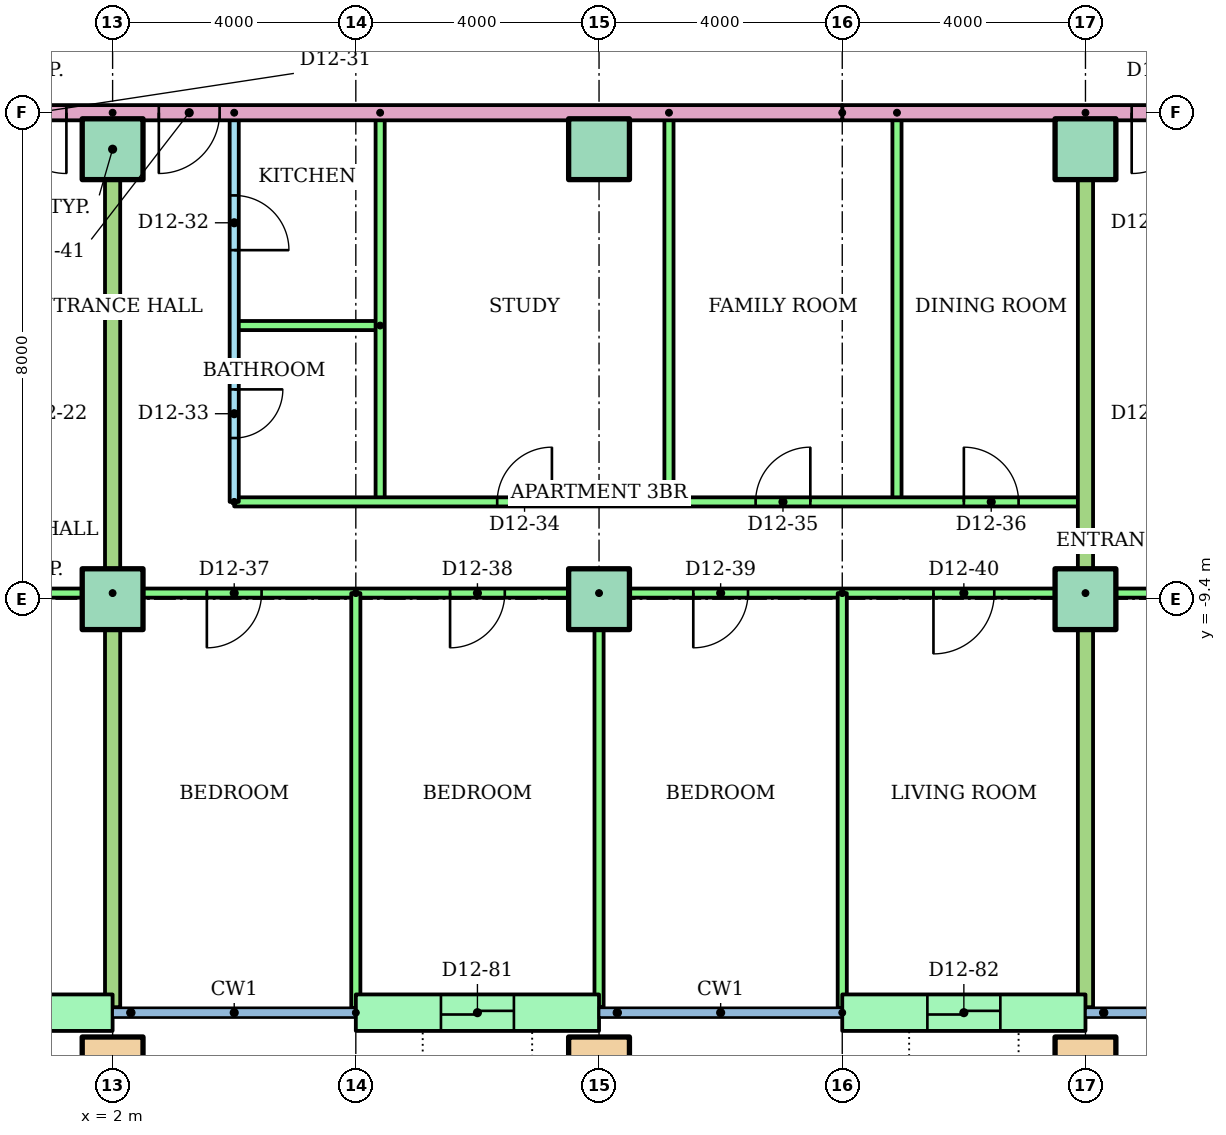
"""IFC4 building model, lengths in metres.
Left out: names, types, materials, properties, quantities, classifications, styles, units other than length and angle.
Written with IfcOpenShell. Run it as: python <this file> out.ifc"""

import sys

from ifc_helpers import new_model, si_unit, direction, frame, frame_2d, origin, origin_2d, place, context, subcontext, project, spatial, rectangle, hollow_rectangle, extrude, element, fill, save


model = new_model("IFC4")
c1 = context("Model", 3, precision=1e-05, world=origin(), true_north=direction((0.0, 1.0)))
c2 = subcontext(c1, "Body", "Model", "MODEL_VIEW")
j1 = project(units=[si_unit("LENGTHUNIT", "METRE"), si_unit("PLANEANGLEUNIT", "RADIAN")], contexts=[c1])
p1 = place(None, origin())
s1 = spatial("IfcSite", under=j1, at=p1, CompositionType="ELEMENT")
p2 = place(p1, origin())
s2 = spatial("IfcBuilding", under=s1, at=p2, CompositionType="ELEMENT")
p3 = place(p2, frame((0.0, 0.0, 48.0)))
s3 = spatial("IfcBuildingStorey", under=s2, at=p3, CompositionType="ELEMENT", Elevation=48.0)
for number, where in (
    (1, (2.0, -17.1, 0.0)),
    (2, (10.0, -17.1, 0.0)),
    (3, (18.0, -17.1, 0.0)),
):
    element("IfcColumn", number, at=place(p3, frame(where)), inside=s3, PredefinedType="COLUMN", context=c2, shape_type="SweptSolid", body=[
        extrude(hollow_rectangle(XDim=1.0, YDim=1.0, WallThickness=0.05, at=origin_2d()), origin(), (0.0, 0.0, 1.0), 3.2),
    ])
for number, where in (
    (4, (2.0, -9.4, 0.0)),
    (5, (10.0, -9.4, 0.0)),
    (6, (18.0, -9.4, 0.0)),
    (7, (2.0, -2.0, 0.0)),
    (8, (10.0, -2.0, 0.0)),
    (9, (18.0, -2.0, 0.0)),
):
    element("IfcColumn", number, at=place(p3, frame(where)), inside=s3, PredefinedType="COLUMN", context=c2, shape_type="SweptSolid", body=[
        extrude(rectangle(XDim=1.0, YDim=1.0, at=origin_2d()), origin(), (0.0, 0.0, 1.0), 3.2),
    ])
p4 = place(p3, frame((-2.0, -16.2, 0.0)))
e10 = element("IfcWall", 10, at=p4, inside=s3, PredefinedType="STANDARD", context=c2, shape_type="SweptSolid", body=[
    extrude(rectangle(XDim=4.0, YDim=0.6, at=frame_2d((2.0, 0.0))), origin(), (0.0, 0.0, 1.0), 2.92),
])
p5 = place(p4, frame((1.4, 0.0, 0.0)))
e11 = element("IfcOpeningElement", 11, at=p5, cuts=e10, PredefinedType="OPENING", context=c2, shape_type="SweptSolid", body=[
    extrude(rectangle(XDim=1.2, YDim=2.1, at=frame_2d((0.6, 1.05))), frame((0.0, 0.31, 0.0), z_axis=(0.0, -1.0, 0.0), x_axis=(1.0, 0.0, 0.0)), (0.0, 0.0, 1.0), 0.62),
])
p6 = place(p3, frame((6.0, -16.2, 0.0)))
e12 = element("IfcWall", 12, at=p6, inside=s3, PredefinedType="STANDARD", context=c2, shape_type="SweptSolid", body=[
    extrude(rectangle(XDim=4.0, YDim=0.6, at=frame_2d((2.0, 0.0))), origin(), (0.0, 0.0, 1.0), 2.92),
])
p7 = place(p6, frame((1.4, 0.0, 0.0)))
e13 = element("IfcOpeningElement", 13, at=p7, cuts=e12, PredefinedType="OPENING", context=c2, shape_type="SweptSolid", body=[
    extrude(rectangle(XDim=1.2, YDim=2.1, at=frame_2d((0.6, 1.05))), frame((0.0, 0.31, 0.0), z_axis=(0.0, -1.0, 0.0), x_axis=(1.0, 0.0, 0.0)), (0.0, 0.0, 1.0), 0.62),
])
p8 = place(p3, frame((14.0, -16.2, 0.0)))
e14 = element("IfcWall", 14, at=p8, inside=s3, PredefinedType="STANDARD", context=c2, shape_type="SweptSolid", body=[
    extrude(rectangle(XDim=4.0, YDim=0.6, at=frame_2d((2.0, 0.0))), origin(), (0.0, 0.0, 1.0), 2.92),
])
p9 = place(p8, frame((1.4, 0.0, 0.0)))
e15 = element("IfcOpeningElement", 15, at=p9, cuts=e14, PredefinedType="OPENING", context=c2, shape_type="SweptSolid", body=[
    extrude(rectangle(XDim=1.2, YDim=2.1, at=frame_2d((0.6, 1.05))), frame((0.0, 0.31, 0.0), z_axis=(0.0, -1.0, 0.0), x_axis=(1.0, 0.0, 0.0)), (0.0, 0.0, 1.0), 0.62),
])
p10 = place(p3, frame((2.0, -9.3, 0.0), z_axis=(0.0, 0.0, 1.0), x_axis=(-1.0, 0.0, 0.0)))
e16 = element("IfcWall", 16, at=p10, inside=s3, PredefinedType="PARTITIONING", context=c2, shape_type="SweptSolid", body=[
    extrude(rectangle(XDim=24.0, YDim=0.15, at=frame_2d((12.0, 0.0))), origin(), (0.0, 0.0, 1.0), 2.4),
])
p11 = place(p10, frame((19.5, 0.0, 0.0)))
e17 = element("IfcOpeningElement", 17, at=p11, cuts=e16, PredefinedType="OPENING", context=c2, shape_type="SweptSolid", body=[
    extrude(rectangle(XDim=1.0, YDim=2.1, at=frame_2d((0.5, 1.05))), frame((0.0, 0.085, 0.0), z_axis=(0.0, -1.0, 0.0), x_axis=(1.0, 0.0, 0.0)), (0.0, 0.0, 1.0), 0.17),
])
p12 = place(p10, frame((13.55, 0.0, 0.0)))
e18 = element("IfcOpeningElement", 18, at=p12, cuts=e16, PredefinedType="OPENING", context=c2, shape_type="SweptSolid", body=[
    extrude(rectangle(XDim=0.9, YDim=2.1, at=frame_2d((0.45, 1.05))), frame((0.0, 0.085, 0.0), z_axis=(0.0, -1.0, 0.0), x_axis=(1.0, 0.0, 0.0)), (0.0, 0.0, 1.0), 0.17),
])
p13 = place(p10, frame((9.55, 0.0, 0.0)))
e19 = element("IfcOpeningElement", 19, at=p13, cuts=e16, PredefinedType="OPENING", context=c2, shape_type="SweptSolid", body=[
    extrude(rectangle(XDim=0.9, YDim=2.1, at=frame_2d((0.45, 1.05))), frame((0.0, 0.085, 0.0), z_axis=(0.0, -1.0, 0.0), x_axis=(1.0, 0.0, 0.0)), (0.0, 0.0, 1.0), 0.17),
])
p14 = place(p10, frame((5.55, 0.0, 0.0)))
e20 = element("IfcOpeningElement", 20, at=p14, cuts=e16, PredefinedType="OPENING", context=c2, shape_type="SweptSolid", body=[
    extrude(rectangle(XDim=0.9, YDim=2.1, at=frame_2d((0.45, 1.05))), frame((0.0, 0.085, 0.0), z_axis=(0.0, -1.0, 0.0), x_axis=(1.0, 0.0, 0.0)), (0.0, 0.0, 1.0), 0.17),
])
p15 = place(p10, frame((1.55, 0.0, 0.0)))
e21 = element("IfcOpeningElement", 21, at=p15, cuts=e16, PredefinedType="OPENING", context=c2, shape_type="SweptSolid", body=[
    extrude(rectangle(XDim=0.9, YDim=2.1, at=frame_2d((0.45, 1.05))), frame((0.0, 0.085, 0.0), z_axis=(0.0, -1.0, 0.0), x_axis=(1.0, 0.0, 0.0)), (0.0, 0.0, 1.0), 0.17),
])
p16 = place(p3, frame((4.0, -1.4, 0.0), z_axis=(0.0, 0.0, 1.0), x_axis=(0.0, -1.0, 0.0)))
e22 = element("IfcWall", 22, at=p16, inside=s3, PredefinedType="PARTITIONING", context=c2, shape_type="SweptSolid", body=[
    extrude(rectangle(XDim=6.4, YDim=0.15, at=frame_2d((3.2, 0.0))), origin(), (0.0, 0.0, 1.0), 2.4),
])
p17 = place(p16, frame((1.36, 0.0, 0.0)))
e23 = element("IfcOpeningElement", 23, at=p17, cuts=e22, PredefinedType="OPENING", context=c2, shape_type="SweptSolid", body=[
    extrude(rectangle(XDim=0.9, YDim=2.1, at=frame_2d((0.45, 1.05))), frame((0.0, 0.085, 0.0), z_axis=(0.0, -1.0, 0.0), x_axis=(1.0, 0.0, 0.0)), (0.0, 0.0, 1.0), 0.17),
])
p18 = place(p16, frame((4.55, 0.0, 0.0)))
e24 = element("IfcOpeningElement", 24, at=p18, cuts=e22, PredefinedType="OPENING", context=c2, shape_type="SweptSolid", body=[
    extrude(rectangle(XDim=0.8, YDim=2.1, at=frame_2d((0.4, 1.05))), frame((0.0, 0.085, 0.0), z_axis=(0.0, -1.0, 0.0), x_axis=(1.0, 0.0, 0.0)), (0.0, 0.0, 1.0), 0.17),
])
p19 = place(p3, frame((6.4, -4.9, 0.0), z_axis=(0.0, 0.0, 1.0), x_axis=(-1.0, 0.0, 0.0)))
e25 = element("IfcWall", 25, at=p19, inside=s3, PredefinedType="PARTITIONING", context=c2, shape_type="SweptSolid", body=[
    extrude(rectangle(XDim=2.4, YDim=0.15, at=frame_2d((1.2, 0.0))), origin(), (0.0, 0.0, 1.0), 2.4),
])
for number, where, z_axis, x_axis in (
    (26, (6.4, -1.4, 0.0), (0.0, 0.0, 1.0), (0.0, -1.0, 0.0)),
    (27, (11.15, -1.4, 0.0), (0.0, 0.0, 1.0), (0.0, -1.0, 0.0)),
    (28, (14.9, -1.4, 0.0), (0.0, 0.0, 1.0), (0.0, -1.0, 0.0)),
):
    element("IfcWall", number, at=place(p3, frame(where, z_axis=z_axis, x_axis=x_axis)), inside=s3, PredefinedType="PARTITIONING", context=c2, shape_type="SweptSolid", body=[
        extrude(rectangle(XDim=6.4, YDim=0.15, at=frame_2d((3.2, 0.0))), origin(), (0.0, 0.0, 1.0), 2.4),
    ])
p20 = place(p3, frame((4.0, -7.8, 0.0)))
e29 = element("IfcWall", 29, at=p20, inside=s3, PredefinedType="PARTITIONING", context=c2, shape_type="SweptSolid", body=[
    extrude(rectangle(XDim=14.0, YDim=0.15, at=frame_2d((7.0, 0.0))), origin(), (0.0, 0.0, 1.0), 2.4),
])
p21 = place(p20, frame((4.325, 0.0, 0.0)))
e30 = element("IfcOpeningElement", 30, at=p21, cuts=e29, PredefinedType="OPENING", context=c2, shape_type="SweptSolid", body=[
    extrude(rectangle(XDim=0.9, YDim=2.1, at=frame_2d((0.45, 1.05))), frame((0.0, 0.085, 0.0), z_axis=(0.0, -1.0, 0.0), x_axis=(1.0, 0.0, 0.0)), (0.0, 0.0, 1.0), 0.17),
])
p22 = place(p20, frame((8.575, 0.0, 0.0)))
e31 = element("IfcOpeningElement", 31, at=p22, cuts=e29, PredefinedType="OPENING", context=c2, shape_type="SweptSolid", body=[
    extrude(rectangle(XDim=0.9, YDim=2.1, at=frame_2d((0.45, 1.05))), frame((0.0, 0.085, 0.0), z_axis=(0.0, -1.0, 0.0), x_axis=(1.0, 0.0, 0.0)), (0.0, 0.0, 1.0), 0.17),
])
p23 = place(p20, frame((12.0, 0.0, 0.0)))
e32 = element("IfcOpeningElement", 32, at=p23, cuts=e29, PredefinedType="OPENING", context=c2, shape_type="SweptSolid", body=[
    extrude(rectangle(XDim=0.9, YDim=2.1, at=frame_2d((0.45, 1.05))), frame((0.0, 0.085, 0.0), z_axis=(0.0, -1.0, 0.0), x_axis=(1.0, 0.0, 0.0)), (0.0, 0.0, 1.0), 0.17),
])
p24 = place(p3, frame((18.0, -9.3, 0.0), z_axis=(0.0, 0.0, 1.0), x_axis=(-1.0, 0.0, 0.0)))
e33 = element("IfcWall", 33, at=p24, inside=s3, PredefinedType="PARTITIONING", context=c2, shape_type="SweptSolid", body=[
    extrude(rectangle(XDim=16.0, YDim=0.15, at=frame_2d((8.0, 0.0))), origin(), (0.0, 0.0, 1.0), 2.4),
])
p25 = place(p24, frame((13.55, 0.0, 0.0)))
e34 = element("IfcOpeningElement", 34, at=p25, cuts=e33, PredefinedType="OPENING", context=c2, shape_type="SweptSolid", body=[
    extrude(rectangle(XDim=0.9, YDim=2.1, at=frame_2d((0.45, 1.05))), frame((0.0, 0.085, 0.0), z_axis=(0.0, -1.0, 0.0), x_axis=(1.0, 0.0, 0.0)), (0.0, 0.0, 1.0), 0.17),
])
p26 = place(p24, frame((9.55, 0.0, 0.0)))
e35 = element("IfcOpeningElement", 35, at=p26, cuts=e33, PredefinedType="OPENING", context=c2, shape_type="SweptSolid", body=[
    extrude(rectangle(XDim=0.9, YDim=2.1, at=frame_2d((0.45, 1.05))), frame((0.0, 0.085, 0.0), z_axis=(0.0, -1.0, 0.0), x_axis=(1.0, 0.0, 0.0)), (0.0, 0.0, 1.0), 0.17),
])
p27 = place(p24, frame((5.55, 0.0, 0.0)))
e36 = element("IfcOpeningElement", 36, at=p27, cuts=e33, PredefinedType="OPENING", context=c2, shape_type="SweptSolid", body=[
    extrude(rectangle(XDim=0.9, YDim=2.1, at=frame_2d((0.45, 1.05))), frame((0.0, 0.085, 0.0), z_axis=(0.0, -1.0, 0.0), x_axis=(1.0, 0.0, 0.0)), (0.0, 0.0, 1.0), 0.17),
])
p28 = place(p24, frame((1.5, 0.0, 0.0)))
e37 = element("IfcOpeningElement", 37, at=p28, cuts=e33, PredefinedType="OPENING", context=c2, shape_type="SweptSolid", body=[
    extrude(rectangle(XDim=1.0, YDim=2.1, at=frame_2d((0.5, 1.05))), frame((0.0, 0.085, 0.0), z_axis=(0.0, -1.0, 0.0), x_axis=(1.0, 0.0, 0.0)), (0.0, 0.0, 1.0), 0.17),
])
p29 = place(p3, frame((6.0, -9.3, 0.0), z_axis=(0.0, 0.0, 1.0), x_axis=(0.0, -1.0, 0.0)))
e38 = element("IfcWall", 38, at=p29, inside=s3, PredefinedType="PARTITIONING", context=c2, shape_type="SweptSolid", body=[
    extrude(rectangle(XDim=6.821, YDim=0.15, at=frame_2d((3.411, 0.0))), origin(), (0.0, 0.0, 1.0), 2.4),
])
p30 = place(p3, frame((10.0, -9.3, 0.0), z_axis=(0.0, 0.0, 1.0), x_axis=(0.0, -1.0, 0.0)))
e39 = element("IfcWall", 39, at=p30, inside=s3, PredefinedType="PARTITIONING", context=c2, shape_type="SweptSolid", body=[
    extrude(rectangle(XDim=6.81, YDim=0.15, at=frame_2d((3.405, 0.0))), origin(), (0.0, 0.0, 1.0), 2.4),
])
p31 = place(p3, frame((14.0, -9.3, 0.0), z_axis=(0.0, 0.0, 1.0), x_axis=(0.0, -1.0, 0.0)))
e40 = element("IfcWall", 40, at=p31, inside=s3, PredefinedType="PARTITIONING", context=c2, shape_type="SweptSolid", body=[
    extrude(rectangle(XDim=6.821, YDim=0.15, at=frame_2d((3.411, 0.0))), origin(), (0.0, 0.0, 1.0), 2.4),
])
p32 = place(p3, frame((2.0, -1.4, 0.0), z_axis=(0.0, 0.0, 1.0), x_axis=(0.0, -1.0, 0.0)))
e41 = element("IfcWall", 41, at=p32, inside=s3, PredefinedType="PARTITIONING", context=c2, shape_type="SweptSolid", body=[
    extrude(rectangle(XDim=14.71, YDim=0.25, at=frame_2d((7.355, 0.0))), origin(), (0.0, 0.0, 1.0), 2.4),
])
p33 = place(p3, frame((36.52, -9.3, 0.0), z_axis=(0.0, 0.0, 1.0), x_axis=(-1.0, 0.0, 0.0)))
e42 = element("IfcWall", 42, at=p33, inside=s3, PredefinedType="PARTITIONING", context=c2, shape_type="SweptSolid", body=[
    extrude(rectangle(XDim=18.52, YDim=0.15, at=frame_2d((9.26, 0.0))), origin(), (0.0, 0.0, 1.0), 2.4),
])
p34 = place(p33, frame((14.02, 0.0, 0.0)))
e43 = element("IfcOpeningElement", 43, at=p34, cuts=e42, PredefinedType="OPENING", context=c2, shape_type="SweptSolid", body=[
    extrude(rectangle(XDim=1.0, YDim=2.1, at=frame_2d((0.5, 1.05))), frame((0.0, 0.085, 0.0), z_axis=(0.0, -1.0, 0.0), x_axis=(1.0, 0.0, 0.0)), (0.0, 0.0, 1.0), 0.17),
])
p35 = place(p33, frame((7.17, 0.0, 0.0)))
e44 = element("IfcOpeningElement", 44, at=p35, cuts=e42, PredefinedType="OPENING", context=c2, shape_type="SweptSolid", body=[
    extrude(rectangle(XDim=0.9, YDim=2.1, at=frame_2d((0.45, 1.05))), frame((0.0, 0.085, 0.0), z_axis=(0.0, -1.0, 0.0), x_axis=(1.0, 0.0, 0.0)), (0.0, 0.0, 1.0), 0.17),
])
p36 = place(p33, frame((0.86, 0.0, 0.0)))
e45 = element("IfcOpeningElement", 45, at=p36, cuts=e42, PredefinedType="OPENING", context=c2, shape_type="SweptSolid", body=[
    extrude(rectangle(XDim=0.9, YDim=2.1, at=frame_2d((0.45, 1.05))), frame((0.0, 0.085, 0.0), z_axis=(0.0, -1.0, 0.0), x_axis=(1.0, 0.0, 0.0)), (0.0, 0.0, 1.0), 0.17),
])
p37 = place(p3, frame((18.0, -1.4, 0.0), z_axis=(0.0, 0.0, 1.0), x_axis=(0.0, -1.0, 0.0)))
e46 = element("IfcWall", 46, at=p37, inside=s3, PredefinedType="PARTITIONING", context=c2, shape_type="SweptSolid", body=[
    extrude(rectangle(XDim=14.71, YDim=0.25, at=frame_2d((7.355, 0.0))), origin(), (0.0, 0.0, 1.0), 2.4),
])
p38 = place(p3, frame((29.0, -1.4, 0.0), z_axis=(0.0, 0.0, 1.0), x_axis=(-1.0, 0.0, 0.0)))
e47 = element("IfcWall", 47, at=p38, inside=s3, PredefinedType="PARTITIONING", context=c2, shape_type="SweptSolid", body=[
    extrude(rectangle(XDim=15.0, YDim=0.25, at=frame_2d((7.5, 0.0))), origin(), (0.0, 0.0, 1.0), 2.4),
])
p39 = place(p38, frame((9.24, 0.0, 0.0)))
e48 = element("IfcOpeningElement", 48, at=p39, cuts=e47, PredefinedType="OPENING", context=c2, shape_type="SweptSolid", body=[
    extrude(rectangle(XDim=1.0, YDim=2.1, at=frame_2d((0.5, 1.05))), frame((0.0, 0.135, 0.0), z_axis=(0.0, -1.0, 0.0), x_axis=(1.0, 0.0, 0.0)), (0.0, 0.0, 1.0), 0.27),
])
p40 = place(p3, frame((14.0, -1.4, 0.0), z_axis=(0.0, 0.0, 1.0), x_axis=(-1.0, 0.0, 0.0)))
e49 = element("IfcWall", 49, at=p40, inside=s3, PredefinedType="PARTITIONING", context=c2, shape_type="SweptSolid", body=[
    extrude(rectangle(XDim=28.0, YDim=0.25, at=frame_2d((14.0, 0.0))), origin(), (0.0, 0.0, 1.0), 2.4),
])
p41 = place(p40, frame((12.76, 0.0, 0.0)))
e50 = element("IfcOpeningElement", 50, at=p41, cuts=e49, PredefinedType="OPENING", context=c2, shape_type="SweptSolid", body=[
    extrude(rectangle(XDim=1.0, YDim=2.1, at=frame_2d((0.5, 1.05))), frame((0.0, 0.135, 0.0), z_axis=(0.0, -1.0, 0.0), x_axis=(1.0, 0.0, 0.0)), (0.0, 0.0, 1.0), 0.27),
])
p42 = place(p40, frame((10.24, 0.0, 0.0)))
e51 = element("IfcOpeningElement", 51, at=p42, cuts=e49, PredefinedType="OPENING", context=c2, shape_type="SweptSolid", body=[
    extrude(rectangle(XDim=1.0, YDim=2.1, at=frame_2d((0.5, 1.05))), frame((0.0, 0.135, 0.0), z_axis=(0.0, -1.0, 0.0), x_axis=(1.0, 0.0, 0.0)), (0.0, 0.0, 1.0), 0.27),
])
p43 = place(p41, origin())
e52 = element("IfcDoor", 52, at=p43, inside=s3, OperationType="SINGLE_SWING_LEFT", PredefinedType="DOOR", context=c2, shape_type="SweptSolid", body=[
    extrude(rectangle(XDim=1.0, YDim=2.1, at=frame_2d((0.5, 1.05))), frame((0.0, 0.025, 0.0), z_axis=(0.0, -1.0, 0.0), x_axis=(1.0, 0.0, 0.0)), (0.0, 0.0, 1.0), 0.05),
])
fill(e50, e52)
p44 = place(p17, origin())
e53 = element("IfcDoor", 53, at=p44, inside=s3, OperationType="SINGLE_SWING_RIGHT", PredefinedType="DOOR", context=c2, shape_type="SweptSolid", body=[
    extrude(rectangle(XDim=0.9, YDim=2.1, at=frame_2d((0.45, 1.05))), frame((0.0, 0.025, 0.0), z_axis=(0.0, -1.0, 0.0), x_axis=(1.0, 0.0, 0.0)), (0.0, 0.0, 1.0), 0.05),
])
fill(e23, e53)
p45 = place(p18, origin())
e54 = element("IfcDoor", 54, at=p45, inside=s3, OperationType="SINGLE_SWING_LEFT", PredefinedType="DOOR", context=c2, shape_type="SweptSolid", body=[
    extrude(rectangle(XDim=0.8, YDim=2.1, at=frame_2d((0.4, 1.05))), frame((0.0, 0.025, 0.0), z_axis=(0.0, -1.0, 0.0), x_axis=(1.0, 0.0, 0.0)), (0.0, 0.0, 1.0), 0.05),
])
fill(e24, e54)
p46 = place(p21, origin())
e55 = element("IfcDoor", 55, at=p46, inside=s3, OperationType="SINGLE_SWING_RIGHT", PredefinedType="DOOR", context=c2, shape_type="SweptSolid", body=[
    extrude(rectangle(XDim=0.9, YDim=2.1, at=frame_2d((0.45, 1.05))), frame((0.0, 0.025, 0.0), z_axis=(0.0, -1.0, 0.0), x_axis=(1.0, 0.0, 0.0)), (0.0, 0.0, 1.0), 0.05),
])
fill(e30, e55)
p47 = place(p22, origin())
e56 = element("IfcDoor", 56, at=p47, inside=s3, OperationType="SINGLE_SWING_RIGHT", PredefinedType="DOOR", context=c2, shape_type="SweptSolid", body=[
    extrude(rectangle(XDim=0.9, YDim=2.1, at=frame_2d((0.45, 1.05))), frame((0.0, 0.025, 0.0), z_axis=(0.0, -1.0, 0.0), x_axis=(1.0, 0.0, 0.0)), (0.0, 0.0, 1.0), 0.05),
])
fill(e31, e56)
p48 = place(p23, origin())
e57 = element("IfcDoor", 57, at=p48, inside=s3, OperationType="SINGLE_SWING_LEFT", PredefinedType="DOOR", context=c2, shape_type="SweptSolid", body=[
    extrude(rectangle(XDim=0.9, YDim=2.1, at=frame_2d((0.45, 1.05))), frame((0.0, 0.025, 0.0), z_axis=(0.0, -1.0, 0.0), x_axis=(1.0, 0.0, 0.0)), (0.0, 0.0, 1.0), 0.05),
])
fill(e32, e57)
p49 = place(p25, origin())
e58 = element("IfcDoor", 58, at=p49, inside=s3, OperationType="SINGLE_SWING_RIGHT", PredefinedType="DOOR", context=c2, shape_type="SweptSolid", body=[
    extrude(rectangle(XDim=0.9, YDim=2.1, at=frame_2d((0.45, 1.05))), frame((0.0, 0.025, 0.0), z_axis=(0.0, -1.0, 0.0), x_axis=(1.0, 0.0, 0.0)), (0.0, 0.0, 1.0), 0.05),
])
fill(e34, e58)
p50 = place(p26, origin())
e59 = element("IfcDoor", 59, at=p50, inside=s3, OperationType="SINGLE_SWING_RIGHT", PredefinedType="DOOR", context=c2, shape_type="SweptSolid", body=[
    extrude(rectangle(XDim=0.9, YDim=2.1, at=frame_2d((0.45, 1.05))), frame((0.0, 0.025, 0.0), z_axis=(0.0, -1.0, 0.0), x_axis=(1.0, 0.0, 0.0)), (0.0, 0.0, 1.0), 0.05),
])
fill(e35, e59)
p51 = place(p27, origin())
e60 = element("IfcDoor", 60, at=p51, inside=s3, OperationType="SINGLE_SWING_RIGHT", PredefinedType="DOOR", context=c2, shape_type="SweptSolid", body=[
    extrude(rectangle(XDim=0.9, YDim=2.1, at=frame_2d((0.45, 1.05))), frame((0.0, 0.025, 0.0), z_axis=(0.0, -1.0, 0.0), x_axis=(1.0, 0.0, 0.0)), (0.0, 0.0, 1.0), 0.05),
])
fill(e36, e60)
p52 = place(p28, origin())
e61 = element("IfcDoor", 61, at=p52, inside=s3, OperationType="SINGLE_SWING_RIGHT", PredefinedType="DOOR", context=c2, shape_type="SweptSolid", body=[
    extrude(rectangle(XDim=1.0, YDim=2.1, at=frame_2d((0.5, 1.05))), frame((0.0, 0.025, 0.0), z_axis=(0.0, -1.0, 0.0), x_axis=(1.0, 0.0, 0.0)), (0.0, 0.0, 1.0), 0.05),
])
fill(e37, e61)
p53 = place(p42, origin())
e62 = element("IfcDoor", 62, at=p53, inside=s3, OperationType="SINGLE_SWING_RIGHT", PredefinedType="DOOR", context=c2, shape_type="SweptSolid", body=[
    extrude(rectangle(XDim=1.0, YDim=2.1, at=frame_2d((0.5, 1.05))), frame((0.0, 0.025, 0.0), z_axis=(0.0, -1.0, 0.0), x_axis=(1.0, 0.0, 0.0)), (0.0, 0.0, 1.0), 0.05),
])
fill(e51, e62)
p54 = place(p39, origin())
e63 = element("IfcDoor", 63, at=p54, inside=s3, OperationType="SINGLE_SWING_RIGHT", PredefinedType="DOOR", context=c2, shape_type="SweptSolid", body=[
    extrude(rectangle(XDim=1.0, YDim=2.1, at=frame_2d((0.5, 1.05))), frame((0.0, 0.025, 0.0), z_axis=(0.0, -1.0, 0.0), x_axis=(1.0, 0.0, 0.0)), (0.0, 0.0, 1.0), 0.05),
])
fill(e48, e63)
p55 = place(p7, origin())
e64 = element("IfcDoor", 64, at=p55, inside=s3, OperationType="SLIDING_TO_LEFT", PredefinedType="DOOR", context=c2, shape_type="SweptSolid", body=[
    extrude(rectangle(XDim=1.2, YDim=2.1, at=frame_2d((0.6, 1.05))), frame((0.0, 0.025, 0.0), z_axis=(0.0, -1.0, 0.0), x_axis=(1.0, 0.0, 0.0)), (0.0, 0.0, 1.0), 0.05),
])
fill(e13, e64)
p56 = place(p9, origin())
e65 = element("IfcDoor", 65, at=p56, inside=s3, OperationType="SLIDING_TO_LEFT", PredefinedType="DOOR", context=c2, shape_type="SweptSolid", body=[
    extrude(rectangle(XDim=1.2, YDim=2.1, at=frame_2d((0.6, 1.05))), frame((0.0, 0.025, 0.0), z_axis=(0.0, -1.0, 0.0), x_axis=(1.0, 0.0, 0.0)), (0.0, 0.0, 1.0), 0.05),
])
fill(e15, e65)
save(model, sys.argv[1])
